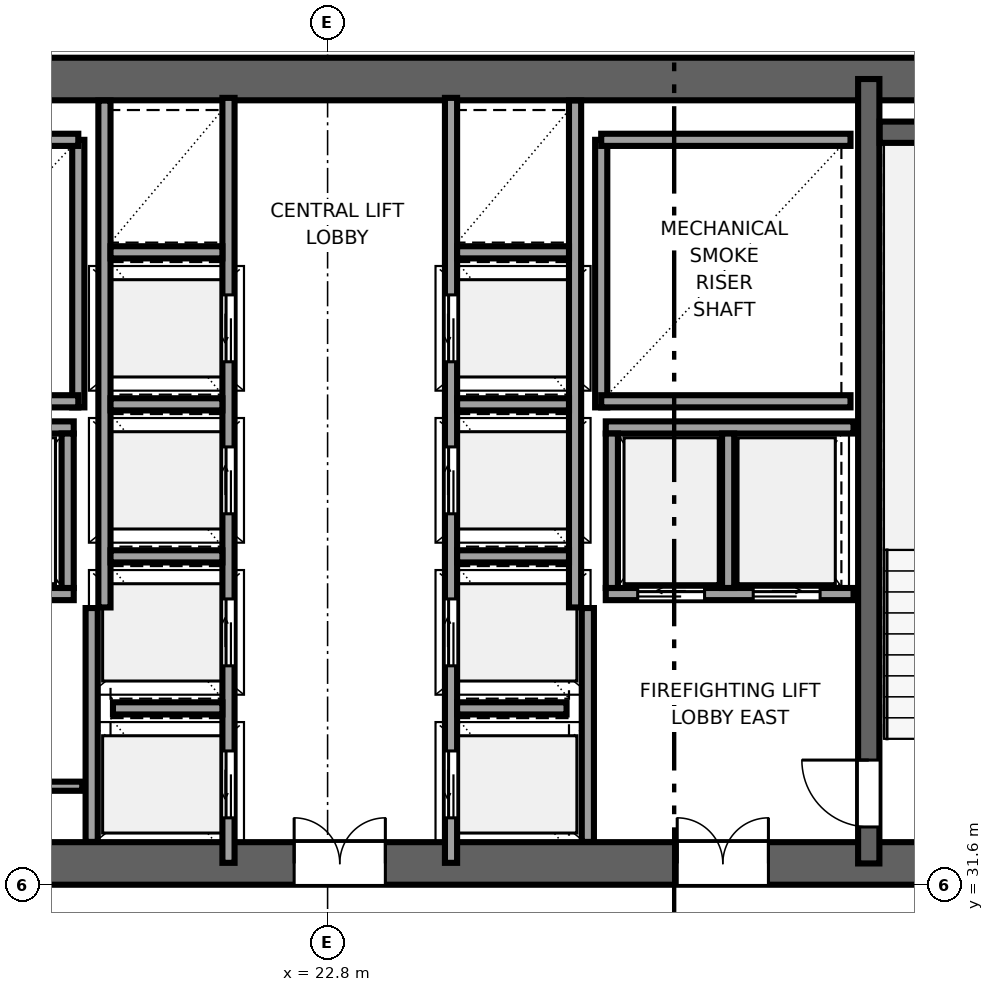
"""IFC4 building model, lengths in metres.
Left out: names, types, materials, properties, quantities, classifications, styles, units other than length and angle.
Written with IfcOpenShell. Run it as: python <this file> out.ifc"""

import sys

from ifc_helpers import new_model, si_unit, direction, frame, frame_2d, origin, place, context, subcontext, project, spatial, rectangle, extrude, source, transform, mapped, element, fill, save


model = new_model("IFC4")
c1 = context("Model", 3, precision=1e-05, world=origin(), true_north=direction((0.0, 1.0)))
c2 = subcontext(c1, "Body", "Model", "MODEL_VIEW")
j1 = project(units=[si_unit("LENGTHUNIT", "METRE"), si_unit("PLANEANGLEUNIT", "RADIAN")], contexts=[c1])
p1 = place(None, origin())
s1 = spatial("IfcSite", under=j1, at=p1, CompositionType="ELEMENT")
p2 = place(p1, origin())
s2 = spatial("IfcBuilding", under=s1, at=p2, CompositionType="ELEMENT")
p3 = place(p2, frame((0.0, 0.0, 100.9)))
s3 = spatial("IfcBuildingStorey", under=s2, at=p3, CompositionType="ELEMENT", Elevation=100.9)
p4 = place(p3, frame((9.8, 31.95, 0.0), z_axis=(0.0, 0.0, 1.0), x_axis=(1.0, 0.0, 0.0)))
e1 = element("IfcWall", 1, at=p4, inside=s3, PredefinedType="SHEAR", context=c2, shape_type="SweptSolid", body=[
    extrude(rectangle(XDim=26.4, YDim=0.7, at=frame_2d((13.2, 0.0))), origin(), (0.0, 0.0, 1.0), 3.55),
])
p5 = place(p4, frame((6.32, 0.0, 0.0), z_axis=(0.0, 0.0, 1.0), x_axis=(-1.0, 0.0, 0.0)))
e2 = element("IfcOpeningElement", 2, at=p5, cuts=e1, PredefinedType="OPENING", context=c2, shape_type="SweptSolid", body=[
    extrude(rectangle(XDim=1.5, YDim=2.04, at=frame_2d((0.75, 1.02))), frame((0.0, 0.36, 0.0), z_axis=(0.0, -1.0, 0.0), x_axis=(1.0, 0.0, 0.0)), (0.0, 0.0, 1.0), 0.72),
])
p6 = place(p4, frame((13.95, 0.0, 0.0), z_axis=(0.0, 0.0, 1.0), x_axis=(-1.0, 0.0, 0.0)))
e3 = element("IfcOpeningElement", 3, at=p6, cuts=e1, PredefinedType="OPENING", context=c2, shape_type="SweptSolid", body=[
    extrude(rectangle(XDim=1.5, YDim=2.04, at=frame_2d((0.75, 1.02))), frame((0.0, 0.36, 0.0), z_axis=(0.0, -1.0, 0.0), x_axis=(1.0, 0.0, 0.0)), (0.0, 0.0, 1.0), 0.72),
])
p7 = place(p4, frame((20.25, 0.0, 0.0), z_axis=(0.0, 0.0, 1.0), x_axis=(-1.0, 0.0, 0.0)))
e4 = element("IfcOpeningElement", 4, at=p7, cuts=e1, PredefinedType="OPENING", context=c2, shape_type="SweptSolid", body=[
    extrude(rectangle(XDim=1.5, YDim=2.04, at=frame_2d((0.75, 1.02))), frame((0.0, 0.36, 0.0), z_axis=(0.0, -1.0, 0.0), x_axis=(1.0, 0.0, 0.0)), (0.0, 0.0, 1.0), 0.72),
])
p8 = place(p4, frame((8.37, 0.0, 0.0), z_axis=(0.0, 0.0, 1.0), x_axis=(-1.0, 0.0, 0.0)))
e5 = element("IfcOpeningElement", 5, at=p8, cuts=e1, PredefinedType="OPENING", context=c2, shape_type="SweptSolid", body=[
    extrude(rectangle(XDim=0.82, YDim=2.01, at=frame_2d((0.41, 1.005))), frame((0.0, 0.36, 0.0), z_axis=(0.0, -1.0, 0.0), x_axis=(1.0, 0.0, 0.0)), (0.0, 0.0, 1.0), 0.72),
])
p9 = place(p3, frame((9.8, 44.85, 0.0), z_axis=(0.0, 0.0, 1.0), x_axis=(1.0, 0.0, 0.0)))
e6 = element("IfcWall", 6, at=p9, inside=s3, PredefinedType="SHEAR", context=c2, shape_type="SweptSolid", body=[
    extrude(rectangle(XDim=26.4, YDim=0.7, at=frame_2d((13.2, 0.0))), origin(), (0.0, 0.0, 1.0), 3.55),
])
p10 = place(p3, frame((31.7, 31.95, 0.0), z_axis=(0.0, 0.0, 1.0), x_axis=(0.0, 1.0, 0.0)))
e7 = element("IfcWall", 7, at=p10, inside=s3, PredefinedType="SHEAR", context=c2, shape_type="SweptSolid", body=[
    extrude(rectangle(XDim=12.9, YDim=0.35, at=frame_2d((6.45, 0.0))), origin(), (0.0, 0.0, 1.0), 3.55),
])
p11 = place(p10, frame((1.7, 0.0, 0.0), z_axis=(0.0, 0.0, 1.0), x_axis=(-1.0, 0.0, 0.0)))
e8 = element("IfcOpeningElement", 8, at=p11, cuts=e7, PredefinedType="OPENING", context=c2, shape_type="SweptSolid", body=[
    extrude(rectangle(XDim=1.1, YDim=2.12, at=frame_2d((0.55, 1.06))), frame((0.0, 0.185, 0.0), z_axis=(0.0, -1.0, 0.0), x_axis=(1.0, 0.0, 0.0)), (0.0, 0.0, 1.0), 0.37),
])
p12 = place(p3, frame((31.88, 43.975, 0.0), z_axis=(0.0, 0.0, 1.0), x_axis=(1.0, 0.0, 0.0)))
e9 = element("IfcWall", 9, at=p12, inside=s3, PredefinedType="SHEAR", context=c2, shape_type="SweptSolid", body=[
    extrude(rectangle(XDim=3.6, YDim=0.35, at=frame_2d((1.8, 0.0))), origin(), (0.0, 0.0, 1.0), 3.55),
])
p13 = place(p3, frame((18.7, 39.45, 0.0), z_axis=(0.0, 0.0, 1.0), x_axis=(0.0, 1.0, 0.0)))
e10 = element("IfcWall", 10, at=p13, inside=s3, PredefinedType="SOLIDWALL", context=c2, shape_type="SweptSolid", body=[
    extrude(rectangle(XDim=4.4, YDim=0.2, at=frame_2d((2.2, 0.0))), origin(), (0.0, 0.0, 1.0), 3.37),
])
for number, where, z_axis, x_axis in (
    (11, (14.6, 39.55, 0.0), (0.0, 0.0, 1.0), (1.0, 0.0, 0.0)),
    (12, (14.6, 43.85, 0.0), (0.0, 0.0, 1.0), (1.0, 0.0, 0.0)),
):
    element("IfcWall", number, at=place(p3, frame(where, z_axis=z_axis, x_axis=x_axis)), inside=s3, PredefinedType="SOLIDWALL", context=c2, shape_type="SweptSolid", body=[
        extrude(rectangle(XDim=4.1, YDim=0.2, at=frame_2d((2.05, 0.0))), origin(), (0.0, 0.0, 1.0), 3.37),
    ])
p14 = place(p3, frame((27.3, 39.45, 0.0), z_axis=(0.0, 0.0, 1.0), x_axis=(0.0, 1.0, 0.0)))
e13 = element("IfcWall", 13, at=p14, inside=s3, PredefinedType="SOLIDWALL", context=c2, shape_type="SweptSolid", body=[
    extrude(rectangle(XDim=4.4, YDim=0.2, at=frame_2d((2.2, 0.0))), origin(), (0.0, 0.0, 1.0), 3.37),
])
for number, where, z_axis, x_axis in (
    (14, (27.3, 39.55, 0.0), (0.0, 0.0, 1.0), (1.0, 0.0, 0.0)),
    (15, (27.3, 43.85, 0.0), (0.0, 0.0, 1.0), (1.0, 0.0, 0.0)),
):
    element("IfcWall", number, at=place(p3, frame(where, z_axis=z_axis, x_axis=x_axis)), inside=s3, PredefinedType="SOLIDWALL", context=c2, shape_type="SweptSolid", body=[
        extrude(rectangle(XDim=4.1, YDim=0.2, at=frame_2d((2.05, 0.0))), origin(), (0.0, 0.0, 1.0), 3.37),
    ])
for number, where, z_axis, x_axis in (
    (16, (18.92, 32.304, 0.0), (0.0, 0.0, 1.0), (0.0, 1.0, 0.0)),
    (17, (27.08, 32.304, 0.0), (0.0, 0.0, 1.0), (0.0, 1.0, 0.0)),
):
    element("IfcWall", number, at=place(p3, frame(where, z_axis=z_axis, x_axis=x_axis)), inside=s3, PredefinedType="SOLIDWALL", context=c2, shape_type="SweptSolid", body=[
        extrude(rectangle(XDim=3.846, YDim=0.2, at=frame_2d((1.923, 0.0))), origin(), (0.0, 0.0, 1.0), 3.37),
    ])
p15 = place(p3, frame((21.17, 31.96, 0.0), z_axis=(0.0, 0.0, 1.0), x_axis=(0.0, 1.0, 0.0)))
e18 = element("IfcWall", 18, at=p15, inside=s3, PredefinedType="SOLIDWALL", context=c2, shape_type="SweptSolid", body=[
    extrude(rectangle(XDim=12.58, YDim=0.2, at=frame_2d((6.29, 0.0))), origin(), (0.0, 0.0, 1.0), 3.37),
])
p16 = place(p15, frame((0.74, 0.0, 0.0)))
e19 = element("IfcOpeningElement", 19, at=p16, cuts=e18, PredefinedType="OPENING", context=c2, shape_type="SweptSolid", body=[
    extrude(rectangle(XDim=1.1, YDim=2.12, at=frame_2d((0.55, 1.06))), frame((0.0, 0.11, 0.0), z_axis=(0.0, -1.0, 0.0), x_axis=(1.0, 0.0, 0.0)), (0.0, 0.0, 1.0), 0.22),
])
p17 = place(p15, frame((3.24, 0.0, 0.0)))
e20 = element("IfcOpeningElement", 20, at=p17, cuts=e18, PredefinedType="OPENING", context=c2, shape_type="SweptSolid", body=[
    extrude(rectangle(XDim=1.1, YDim=2.12, at=frame_2d((0.55, 1.06))), frame((0.0, 0.11, 0.0), z_axis=(0.0, -1.0, 0.0), x_axis=(1.0, 0.0, 0.0)), (0.0, 0.0, 1.0), 0.22),
])
p18 = place(p15, frame((5.74, 0.0, 0.0)))
e21 = element("IfcOpeningElement", 21, at=p18, cuts=e18, PredefinedType="OPENING", context=c2, shape_type="SweptSolid", body=[
    extrude(rectangle(XDim=1.1, YDim=2.12, at=frame_2d((0.55, 1.06))), frame((0.0, 0.11, 0.0), z_axis=(0.0, -1.0, 0.0), x_axis=(1.0, 0.0, 0.0)), (0.0, 0.0, 1.0), 0.22),
])
p19 = place(p15, frame((8.24, 0.0, 0.0)))
e22 = element("IfcOpeningElement", 22, at=p19, cuts=e18, PredefinedType="OPENING", context=c2, shape_type="SweptSolid", body=[
    extrude(rectangle(XDim=1.1, YDim=2.12, at=frame_2d((0.55, 1.06))), frame((0.0, 0.11, 0.0), z_axis=(0.0, -1.0, 0.0), x_axis=(1.0, 0.0, 0.0)), (0.0, 0.0, 1.0), 0.22),
])
p20 = place(p3, frame((19.13, 36.16, 0.0), z_axis=(0.0, 0.0, 1.0), x_axis=(0.0, 1.0, 0.0)))
e23 = element("IfcWall", 23, at=p20, inside=s3, PredefinedType="SOLIDWALL", context=c2, shape_type="SweptSolid", body=[
    extrude(rectangle(XDim=8.336, YDim=0.2, at=frame_2d((4.168, 0.0))), origin(), (0.0, 0.0, 1.0), 3.37),
])
p21 = place(p3, frame((19.27, 34.5, 0.0), z_axis=(0.0, 0.0, 1.0), x_axis=(1.0, 0.0, 0.0)))
e24 = element("IfcWall", 24, at=p21, inside=s3, PredefinedType="SOLIDWALL", context=c2, shape_type="SweptSolid", body=[
    extrude(rectangle(XDim=1.8, YDim=0.2, at=frame_2d((0.9, 0.0))), origin(), (0.0, 0.0, 1.0), 3.37),
])
for number, where, z_axis, x_axis in (
    (25, (19.23, 37.0, 0.0), (0.0, 0.0, 1.0), (1.0, 0.0, 0.0)),
    (26, (19.23, 39.5, 0.0), (0.0, 0.0, 1.0), (1.0, 0.0, 0.0)),
    (27, (19.23, 42.0, 0.0), (0.0, 0.0, 1.0), (1.0, 0.0, 0.0)),
):
    element("IfcWall", number, at=place(p3, frame(where, z_axis=z_axis, x_axis=x_axis)), inside=s3, PredefinedType="SOLIDWALL", context=c2, shape_type="SweptSolid", body=[
        extrude(rectangle(XDim=1.84, YDim=0.2, at=frame_2d((0.92, 0.0))), origin(), (0.0, 0.0, 1.0), 3.37),
    ])
p22 = place(p3, frame((27.375, 36.38, 0.0), z_axis=(0.0, 0.0, 1.0), x_axis=(1.0, 0.0, 0.0)))
e28 = element("IfcWall", 28, at=p22, inside=s3, PredefinedType="SOLIDWALL", context=c2, shape_type="SweptSolid", body=[
    extrude(rectangle(XDim=4.075, YDim=0.2, at=frame_2d((2.038, 0.0))), origin(), (0.0, 0.0, 1.0), 3.37),
])
p23 = place(p22, frame((0.525, 0.0, 0.0)))
e29 = element("IfcOpeningElement", 29, at=p23, cuts=e28, PredefinedType="OPENING", context=c2, shape_type="SweptSolid", body=[
    extrude(rectangle(XDim=1.1, YDim=2.12, at=frame_2d((0.55, 1.06))), frame((0.0, 0.11, 0.0), z_axis=(0.0, -1.0, 0.0), x_axis=(1.0, 0.0, 0.0)), (0.0, 0.0, 1.0), 0.22),
])
p24 = place(p22, frame((2.425, 0.0, 0.0)))
e30 = element("IfcOpeningElement", 30, at=p24, cuts=e28, PredefinedType="OPENING", context=c2, shape_type="SweptSolid", body=[
    extrude(rectangle(XDim=1.1, YDim=2.12, at=frame_2d((0.55, 1.06))), frame((0.0, 0.11, 0.0), z_axis=(0.0, -1.0, 0.0), x_axis=(1.0, 0.0, 0.0)), (0.0, 0.0, 1.0), 0.22),
])
p25 = place(p3, frame((27.375, 39.12, 0.0), z_axis=(0.0, 0.0, 1.0), x_axis=(1.0, 0.0, 0.0)))
e31 = element("IfcWall", 31, at=p25, inside=s3, PredefinedType="SOLIDWALL", context=c2, shape_type="SweptSolid", body=[
    extrude(rectangle(XDim=4.075, YDim=0.2, at=frame_2d((2.038, 0.0))), origin(), (0.0, 0.0, 1.0), 3.37),
])
for number, where, z_axis, x_axis in (
    (32, (27.475, 36.48, 0.0), (0.0, 0.0, 1.0), (0.0, 1.0, 0.0)),
    (33, (29.387, 36.48, 0.0), (0.0, 0.0, 1.0), (0.0, 1.0, 0.0)),
):
    element("IfcWall", number, at=place(p3, frame(where, z_axis=z_axis, x_axis=x_axis)), inside=s3, PredefinedType="SOLIDWALL", context=c2, shape_type="SweptSolid", body=[
        extrude(rectangle(XDim=2.54, YDim=0.2, at=frame_2d((1.27, 0.0))), origin(), (0.0, 0.0, 1.0), 3.37),
    ])
p26 = place(p3, frame((14.55, 36.38, 0.0), z_axis=(0.0, 0.0, 1.0), x_axis=(1.0, 0.0, 0.0)))
e34 = element("IfcWall", 34, at=p26, inside=s3, PredefinedType="SOLIDWALL", context=c2, shape_type="SweptSolid", body=[
    extrude(rectangle(XDim=4.075, YDim=0.2, at=frame_2d((2.038, 0.0))), origin(), (0.0, 0.0, 1.0), 3.37),
])
p27 = place(p26, frame((0.55, 0.0, 0.0)))
e35 = element("IfcOpeningElement", 35, at=p27, cuts=e34, PredefinedType="OPENING", context=c2, shape_type="SweptSolid", body=[
    extrude(rectangle(XDim=1.1, YDim=2.12, at=frame_2d((0.55, 1.06))), frame((0.0, 0.11, 0.0), z_axis=(0.0, -1.0, 0.0), x_axis=(1.0, 0.0, 0.0)), (0.0, 0.0, 1.0), 0.22),
])
p28 = place(p26, frame((2.45, 0.0, 0.0)))
e36 = element("IfcOpeningElement", 36, at=p28, cuts=e34, PredefinedType="OPENING", context=c2, shape_type="SweptSolid", body=[
    extrude(rectangle(XDim=1.1, YDim=2.12, at=frame_2d((0.55, 1.06))), frame((0.0, 0.11, 0.0), z_axis=(0.0, -1.0, 0.0), x_axis=(1.0, 0.0, 0.0)), (0.0, 0.0, 1.0), 0.22),
])
p29 = place(p3, frame((14.55, 39.12, 0.0), z_axis=(0.0, 0.0, 1.0), x_axis=(1.0, 0.0, 0.0)))
e37 = element("IfcWall", 37, at=p29, inside=s3, PredefinedType="SOLIDWALL", context=c2, shape_type="SweptSolid", body=[
    extrude(rectangle(XDim=4.075, YDim=0.2, at=frame_2d((2.038, 0.0))), origin(), (0.0, 0.0, 1.0), 3.37),
])
p30 = place(p3, frame((18.525, 36.48, 0.0), z_axis=(0.0, 0.0, 1.0), x_axis=(0.0, 1.0, 0.0)))
e38 = element("IfcWall", 38, at=p30, inside=s3, PredefinedType="SOLIDWALL", context=c2, shape_type="SweptSolid", body=[
    extrude(rectangle(XDim=2.54, YDim=0.2, at=frame_2d((1.27, 0.0))), origin(), (0.0, 0.0, 1.0), 3.37),
])
p31 = place(p3, frame((24.83, 31.96, 0.0), z_axis=(0.0, 0.0, 1.0), x_axis=(0.0, 1.0, 0.0)))
e39 = element("IfcWall", 39, at=p31, inside=s3, PredefinedType="SOLIDWALL", context=c2, shape_type="SweptSolid", body=[
    extrude(rectangle(XDim=12.58, YDim=0.2, at=frame_2d((6.29, 0.0))), origin(), (0.0, 0.0, 1.0), 3.37),
])
p32 = place(p31, frame((0.74, 0.0, 0.0)))
e40 = element("IfcOpeningElement", 40, at=p32, cuts=e39, PredefinedType="OPENING", context=c2, shape_type="SweptSolid", body=[
    extrude(rectangle(XDim=1.1, YDim=2.12, at=frame_2d((0.55, 1.06))), frame((0.0, 0.11, 0.0), z_axis=(0.0, -1.0, 0.0), x_axis=(1.0, 0.0, 0.0)), (0.0, 0.0, 1.0), 0.22),
])
p33 = place(p31, frame((3.24, 0.0, 0.0)))
e41 = element("IfcOpeningElement", 41, at=p33, cuts=e39, PredefinedType="OPENING", context=c2, shape_type="SweptSolid", body=[
    extrude(rectangle(XDim=1.1, YDim=2.12, at=frame_2d((0.55, 1.06))), frame((0.0, 0.11, 0.0), z_axis=(0.0, -1.0, 0.0), x_axis=(1.0, 0.0, 0.0)), (0.0, 0.0, 1.0), 0.22),
])
p34 = place(p31, frame((5.74, 0.0, 0.0)))
e42 = element("IfcOpeningElement", 42, at=p34, cuts=e39, PredefinedType="OPENING", context=c2, shape_type="SweptSolid", body=[
    extrude(rectangle(XDim=1.1, YDim=2.12, at=frame_2d((0.55, 1.06))), frame((0.0, 0.11, 0.0), z_axis=(0.0, -1.0, 0.0), x_axis=(1.0, 0.0, 0.0)), (0.0, 0.0, 1.0), 0.22),
])
p35 = place(p31, frame((8.24, 0.0, 0.0)))
e43 = element("IfcOpeningElement", 43, at=p35, cuts=e39, PredefinedType="OPENING", context=c2, shape_type="SweptSolid", body=[
    extrude(rectangle(XDim=1.1, YDim=2.12, at=frame_2d((0.55, 1.06))), frame((0.0, 0.11, 0.0), z_axis=(0.0, -1.0, 0.0), x_axis=(1.0, 0.0, 0.0)), (0.0, 0.0, 1.0), 0.22),
])
p36 = place(p3, frame((26.87, 36.16, 0.0), z_axis=(0.0, 0.0, 1.0), x_axis=(0.0, 1.0, 0.0)))
e44 = element("IfcWall", 44, at=p36, inside=s3, PredefinedType="SOLIDWALL", context=c2, shape_type="SweptSolid", body=[
    extrude(rectangle(XDim=8.336, YDim=0.2, at=frame_2d((4.168, 0.0))), origin(), (0.0, 0.0, 1.0), 3.37),
])
p37 = place(p3, frame((24.93, 34.5, 0.0), z_axis=(0.0, 0.0, 1.0), x_axis=(1.0, 0.0, 0.0)))
e45 = element("IfcWall", 45, at=p37, inside=s3, PredefinedType="SOLIDWALL", context=c2, shape_type="SweptSolid", body=[
    extrude(rectangle(XDim=1.8, YDim=0.2, at=frame_2d((0.9, 0.0))), origin(), (0.0, 0.0, 1.0), 3.37),
])
for number, where, z_axis, x_axis in (
    (46, (24.93, 37.0, 0.0), (0.0, 0.0, 1.0), (1.0, 0.0, 0.0)),
    (47, (24.93, 39.5, 0.0), (0.0, 0.0, 1.0), (1.0, 0.0, 0.0)),
    (48, (24.93, 42.0, 0.0), (0.0, 0.0, 1.0), (1.0, 0.0, 0.0)),
):
    element("IfcWall", number, at=place(p3, frame(where, z_axis=z_axis, x_axis=x_axis)), inside=s3, PredefinedType="SOLIDWALL", context=c2, shape_type="SweptSolid", body=[
        extrude(rectangle(XDim=1.84, YDim=0.2, at=frame_2d((0.92, 0.0))), origin(), (0.0, 0.0, 1.0), 3.37),
    ])
p38 = place(p3, frame((16.28, 33.22, 0.0), z_axis=(0.0, 0.0, 1.0), x_axis=(1.0, 0.0, 0.0)))
e49 = element("IfcWall", 49, at=p38, inside=s3, PredefinedType="PARTITIONING", context=c2, shape_type="SweptSolid", body=[
    extrude(rectangle(XDim=2.485, YDim=0.15, at=frame_2d((1.242, 0.0))), origin(), (0.0, 0.0, 1.0), 3.37),
])
m1 = source(origin(), c2, "Body", "SweptSolid", [
    extrude(rectangle(XDim=1.1, YDim=2.12, at=frame_2d((0.55, 1.06))), frame((0.0, 0.025, 0.0), z_axis=(0.0, -1.0, 0.0), x_axis=(1.0, 0.0, 0.0)), (0.0, 0.0, 1.0), 0.05),
])
p39 = place(p11, origin())
e50 = element("IfcDoor", 50, at=p39, inside=s3, OperationType="SINGLE_SWING_RIGHT", PredefinedType="DOOR", context=c2, shape_type="MappedRepresentation", body=[
    mapped(m1, transform((0.0, 0.0, 0.0), x_axis=(1.0, 0.0, 0.0), y_axis=(0.0, 1.0, 0.0), z_axis=(0.0, 0.0, 1.0), scale=1.0)),
])
fill(e8, e50)
m2 = source(origin(), c2, "Body", "SweptSolid", [
    extrude(rectangle(XDim=1.5, YDim=2.04, at=frame_2d((0.75, 1.02))), frame((0.0, 0.025, 0.0), z_axis=(0.0, -1.0, 0.0), x_axis=(1.0, 0.0, 0.0)), (0.0, 0.0, 1.0), 0.05),
])
p40 = place(p6, origin())
e51 = element("IfcDoor", 51, at=p40, inside=s3, OperationType="DOUBLE_DOOR_SINGLE_SWING", PredefinedType="DOOR", context=c2, shape_type="MappedRepresentation", body=[
    mapped(m2, transform((0.0, 0.0, 0.0), x_axis=(1.0, 0.0, 0.0), y_axis=(0.0, 1.0, 0.0), z_axis=(0.0, 0.0, 1.0), scale=1.0)),
])
fill(e3, e51)
p41 = place(p7, origin())
e52 = element("IfcDoor", 52, at=p41, inside=s3, OperationType="DOUBLE_DOOR_SINGLE_SWING", PredefinedType="DOOR", context=c2, shape_type="MappedRepresentation", body=[
    mapped(m2, transform((0.0, 0.0, 0.0), x_axis=(1.0, 0.0, 0.0), y_axis=(0.0, 1.0, 0.0), z_axis=(0.0, 0.0, 1.0), scale=1.0)),
])
fill(e4, e52)
m3 = source(origin(), c2, "Body", "SweptSolid", [
    extrude(rectangle(XDim=1.1, YDim=2.12, at=frame_2d((0.55, 1.06))), frame((0.0, 0.025, 0.0), z_axis=(0.0, -1.0, 0.0), x_axis=(1.0, 0.0, 0.0)), (0.0, 0.0, 1.0), 0.05),
])
p42 = place(p16, origin())
e53 = element("IfcDoor", 53, at=p42, inside=s3, OperationType="SLIDING_TO_LEFT", PredefinedType="DOOR", context=c2, shape_type="MappedRepresentation", body=[
    mapped(m3, transform((0.0, 0.0, 0.0), x_axis=(1.0, 0.0, 0.0), y_axis=(0.0, 1.0, 0.0), z_axis=(0.0, 0.0, 1.0), scale=1.0)),
])
fill(e19, e53)
p43 = place(p17, origin())
e54 = element("IfcDoor", 54, at=p43, inside=s3, OperationType="SLIDING_TO_RIGHT", PredefinedType="DOOR", context=c2, shape_type="MappedRepresentation", body=[
    mapped(m3, transform((0.0, 0.0, 0.0), x_axis=(1.0, 0.0, 0.0), y_axis=(0.0, 1.0, 0.0), z_axis=(0.0, 0.0, 1.0), scale=1.0)),
])
fill(e20, e54)
p44 = place(p18, origin())
e55 = element("IfcDoor", 55, at=p44, inside=s3, OperationType="SLIDING_TO_RIGHT", PredefinedType="DOOR", context=c2, shape_type="MappedRepresentation", body=[
    mapped(m3, transform((0.0, 0.0, 0.0), x_axis=(1.0, 0.0, 0.0), y_axis=(0.0, 1.0, 0.0), z_axis=(0.0, 0.0, 1.0), scale=1.0)),
])
fill(e21, e55)
p45 = place(p19, origin())
e56 = element("IfcDoor", 56, at=p45, inside=s3, OperationType="SLIDING_TO_LEFT", PredefinedType="DOOR", context=c2, shape_type="MappedRepresentation", body=[
    mapped(m3, transform((0.0, 0.0, 0.0), x_axis=(1.0, 0.0, 0.0), y_axis=(0.0, 1.0, 0.0), z_axis=(0.0, 0.0, 1.0), scale=1.0)),
])
fill(e22, e56)
p46 = place(p23, origin())
e57 = element("IfcDoor", 57, at=p46, inside=s3, OperationType="SLIDING_TO_LEFT", PredefinedType="DOOR", context=c2, shape_type="MappedRepresentation", body=[
    mapped(m3, transform((0.0, 0.0, 0.0), x_axis=(1.0, 0.0, 0.0), y_axis=(0.0, 1.0, 0.0), z_axis=(0.0, 0.0, 1.0), scale=1.0)),
])
fill(e29, e57)
p47 = place(p24, origin())
e58 = element("IfcDoor", 58, at=p47, inside=s3, OperationType="SLIDING_TO_RIGHT", PredefinedType="DOOR", context=c2, shape_type="MappedRepresentation", body=[
    mapped(m3, transform((0.0, 0.0, 0.0), x_axis=(1.0, 0.0, 0.0), y_axis=(0.0, 1.0, 0.0), z_axis=(0.0, 0.0, 1.0), scale=1.0)),
])
fill(e30, e58)
p48 = place(p32, origin())
e59 = element("IfcDoor", 59, at=p48, inside=s3, OperationType="SLIDING_TO_LEFT", PredefinedType="DOOR", context=c2, shape_type="MappedRepresentation", body=[
    mapped(m3, transform((0.0, 0.0, 0.0), x_axis=(1.0, 0.0, 0.0), y_axis=(0.0, 1.0, 0.0), z_axis=(0.0, 0.0, 1.0), scale=1.0)),
])
fill(e40, e59)
p49 = place(p33, origin())
e60 = element("IfcDoor", 60, at=p49, inside=s3, OperationType="SLIDING_TO_RIGHT", PredefinedType="DOOR", context=c2, shape_type="MappedRepresentation", body=[
    mapped(m3, transform((0.0, 0.0, 0.0), x_axis=(1.0, 0.0, 0.0), y_axis=(0.0, 1.0, 0.0), z_axis=(0.0, 0.0, 1.0), scale=1.0)),
])
fill(e41, e60)
p50 = place(p34, origin())
e61 = element("IfcDoor", 61, at=p50, inside=s3, OperationType="SLIDING_TO_RIGHT", PredefinedType="DOOR", context=c2, shape_type="MappedRepresentation", body=[
    mapped(m3, transform((0.0, 0.0, 0.0), x_axis=(1.0, 0.0, 0.0), y_axis=(0.0, 1.0, 0.0), z_axis=(0.0, 0.0, 1.0), scale=1.0)),
])
fill(e42, e61)
p51 = place(p35, origin())
e62 = element("IfcDoor", 62, at=p51, inside=s3, OperationType="SLIDING_TO_LEFT", PredefinedType="DOOR", context=c2, shape_type="MappedRepresentation", body=[
    mapped(m3, transform((0.0, 0.0, 0.0), x_axis=(1.0, 0.0, 0.0), y_axis=(0.0, 1.0, 0.0), z_axis=(0.0, 0.0, 1.0), scale=1.0)),
])
fill(e43, e62)
save(model, sys.argv[1])
